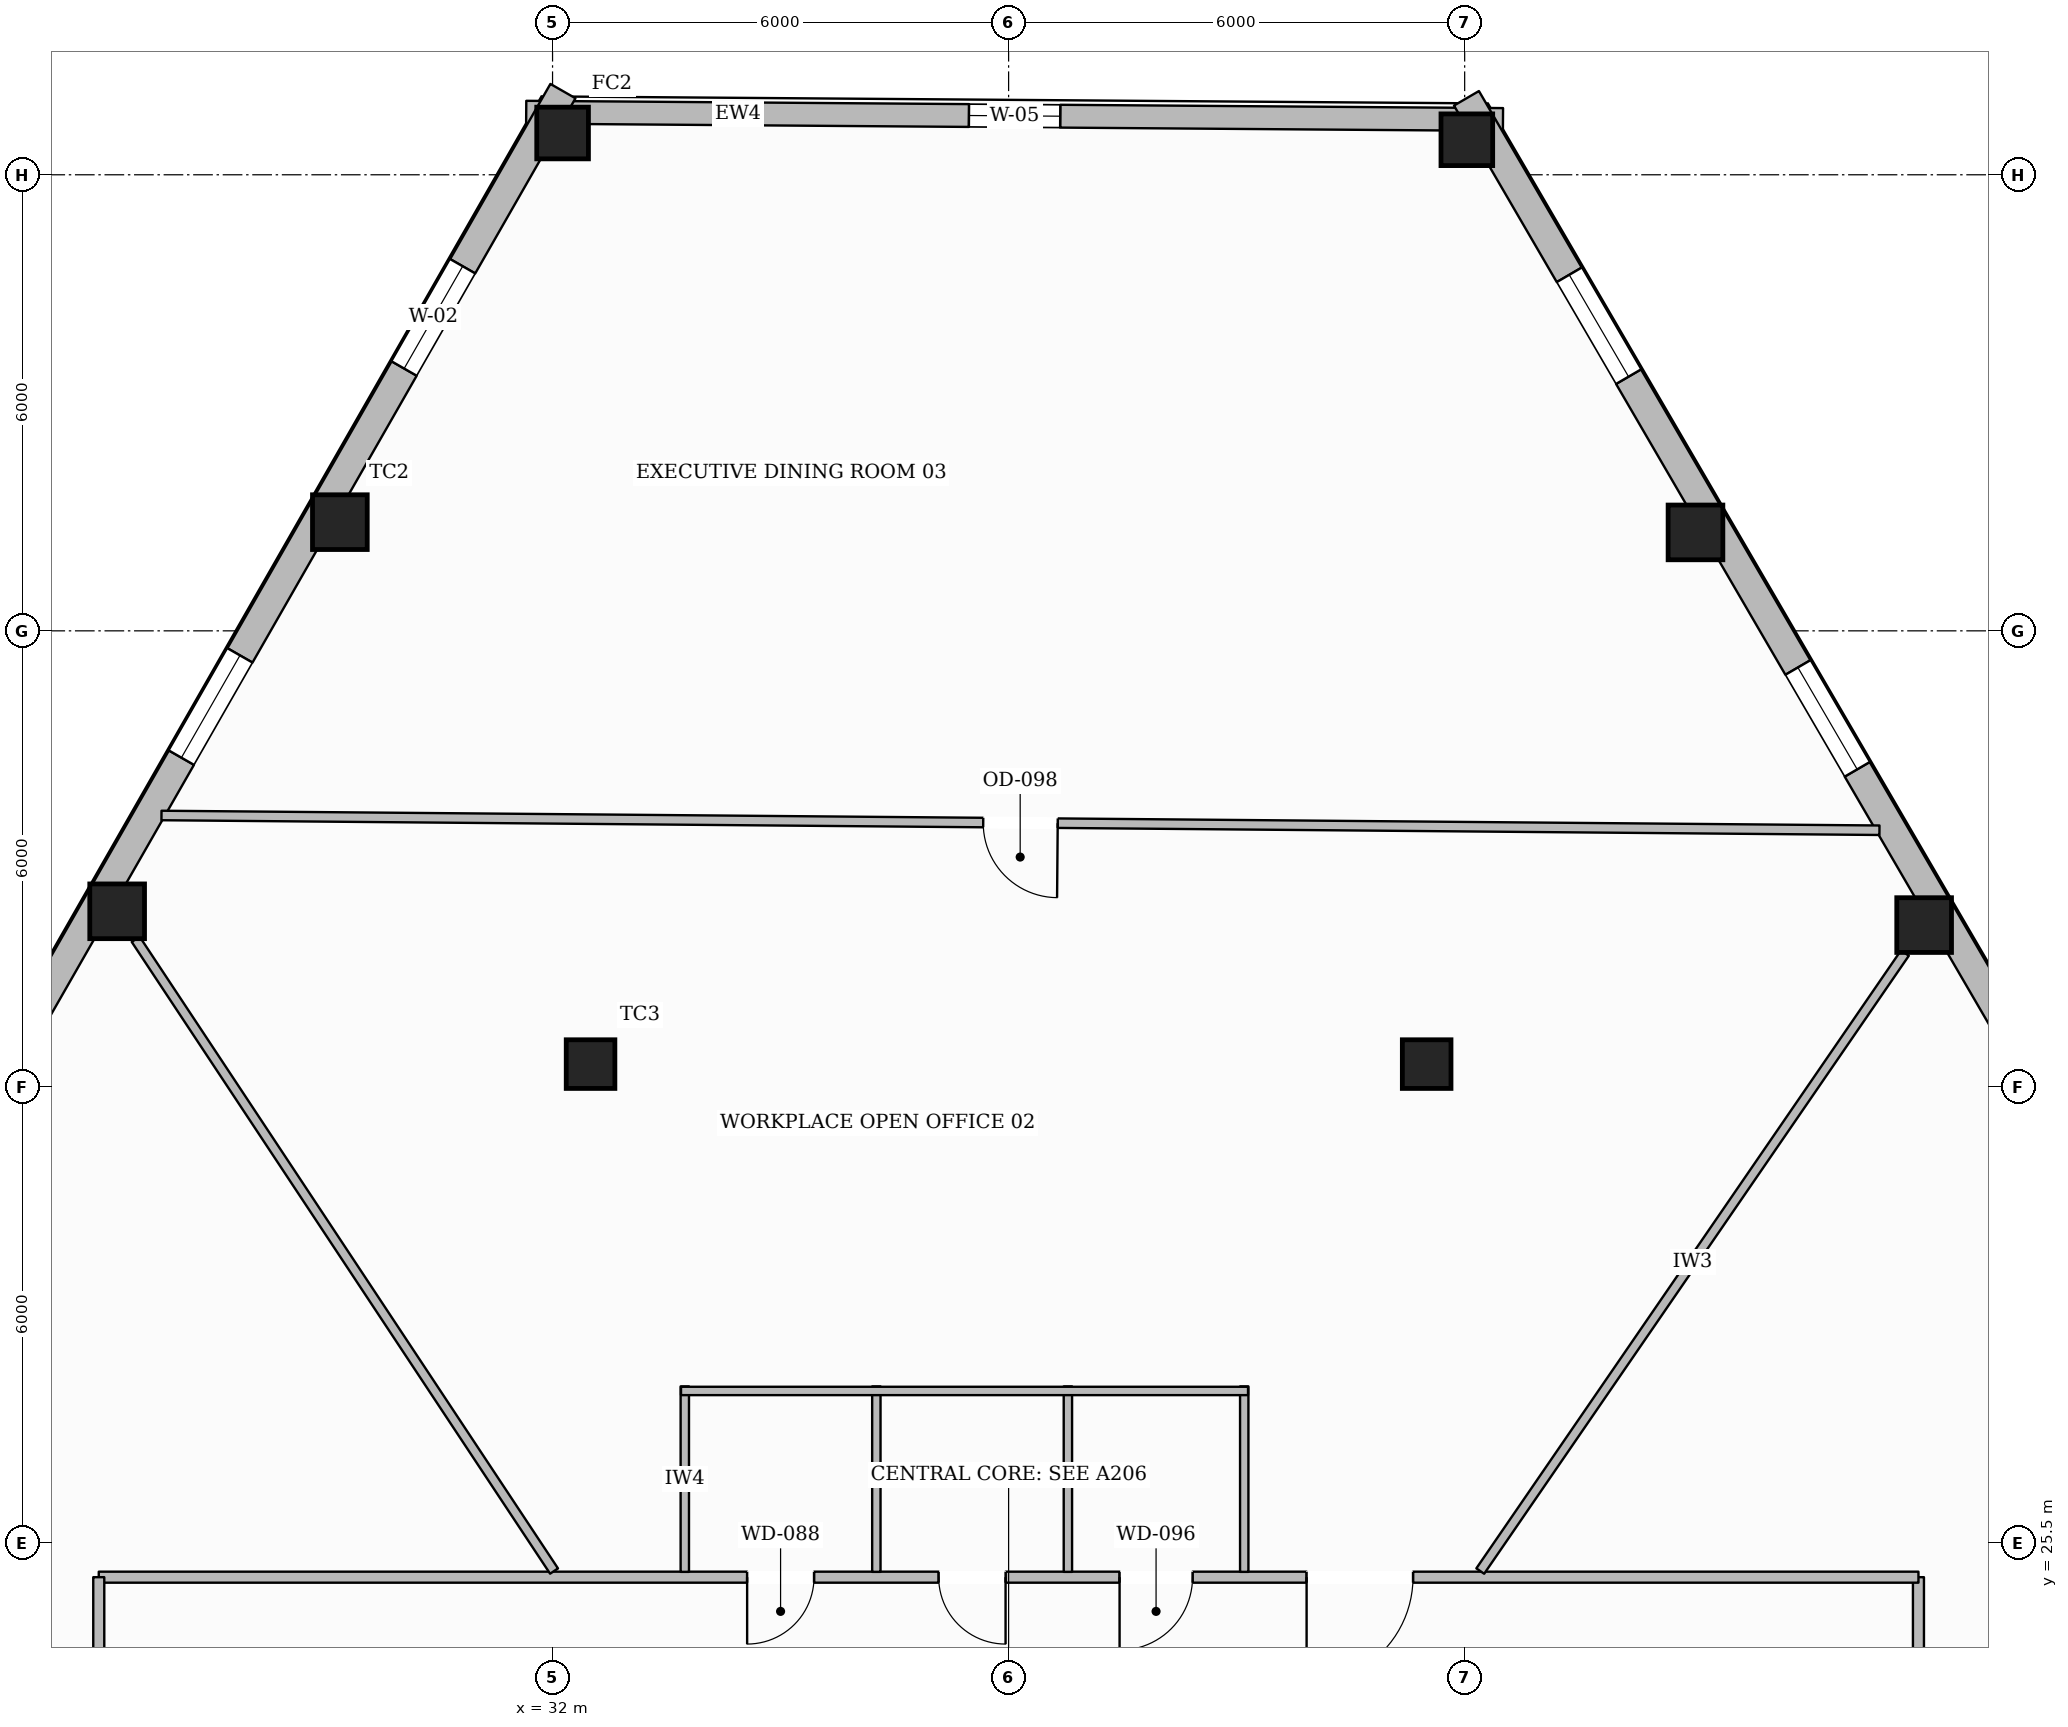
"""IFC4 building model, lengths in metres.
Left out: names, types, materials, properties, quantities, classifications, styles, units other than length and angle.
Written with IfcOpenShell. Run it as: python <this file> out.ifc"""

import sys

from ifc_helpers import new_model, si_unit, direction, frame, frame_2d, origin, origin_2d, place, context, subcontext, project, spatial, rectangle, hollow_rectangle, extrude, element, fill, save


model = new_model("IFC4")
c1 = context("Model", 3, precision=1e-05, world=origin(), true_north=direction((0.0, 1.0)))
c2 = subcontext(c1, "Body", "Model", "MODEL_VIEW")
j1 = project(units=[si_unit("LENGTHUNIT", "METRE"), si_unit("PLANEANGLEUNIT", "RADIAN")], contexts=[c1])
p1 = place(None, origin())
s1 = spatial("IfcSite", under=j1, at=p1, CompositionType="ELEMENT")
p2 = place(p1, origin())
s2 = spatial("IfcBuilding", under=s1, at=p2, CompositionType="ELEMENT")
p3 = place(p2, frame((0.0, 0.0, 116.3)))
s3 = spatial("IfcBuildingStorey", under=s2, at=p3, CompositionType="ELEMENT", Elevation=116.3)
p4 = place(p3, frame((32.132, 44.049, 0.0), z_axis=(0.0, 0.0, 1.0), x_axis=(1.0, 0.0, 0.0)))
e1 = element("IfcColumn", 1, at=p4, inside=s3, PredefinedType="COLUMN", context=c2, shape_type="SweptSolid", body=[
    extrude(hollow_rectangle(XDim=0.68, YDim=0.68, WallThickness=0.03, at=origin_2d()), origin(), (0.0, 0.0, 1.0), 3.6),
])
for number, where, z_axis, x_axis in (
    (2, (29.202, 38.93, 0.0), (0.0, 0.0, 1.0), (1.0, 0.0, 0.0)),
    (3, (26.272, 33.81, 0.0), (0.0, 0.0, 1.0), (1.0, 0.0, 0.0)),
    (4, (50.045, 33.629, 0.0), (0.0, 0.0, 1.0), (1.0, 0.0, 0.0)),
    (5, (47.037, 38.795, 0.0), (0.0, 0.0, 1.0), (1.0, 0.0, 0.0)),
):
    element("IfcColumn", number, at=place(p3, frame(where, z_axis=z_axis, x_axis=x_axis)), inside=s3, PredefinedType="COLUMN", context=c2, shape_type="SweptSolid", body=[
        extrude(hollow_rectangle(XDim=0.72, YDim=0.72, WallThickness=0.032, at=origin_2d()), origin(), (0.0, 0.0, 1.0), 3.6),
    ])
p5 = place(p3, frame((44.029, 43.961, 0.0), z_axis=(0.0, 0.0, 1.0), x_axis=(1.0, 0.0, 0.0)))
e6 = element("IfcColumn", 6, at=p5, inside=s3, PredefinedType="COLUMN", context=c2, shape_type="SweptSolid", body=[
    extrude(hollow_rectangle(XDim=0.68, YDim=0.68, WallThickness=0.03, at=origin_2d()), origin(), (0.0, 0.0, 1.0), 3.6),
])
for number, where, z_axis, x_axis in (
    (7, (32.5, 31.8, 0.0), (0.0, 0.0, 1.0), (1.0, 0.0, 0.0)),
    (8, (43.5, 31.8, 0.0), (0.0, 0.0, 1.0), (1.0, 0.0, 0.0)),
):
    element("IfcColumn", number, at=place(p3, frame(where, z_axis=z_axis, x_axis=x_axis)), inside=s3, PredefinedType="COLUMN", context=c2, shape_type="SweptSolid", body=[
        extrude(hollow_rectangle(XDim=0.64, YDim=0.64, WallThickness=0.028, at=origin_2d()), origin(), (0.0, 0.0, 1.0), 3.6),
    ])
p6 = place(p3, frame((31.654, 44.323, 0.0), z_axis=(0.0, 0.0, 1.0), x_axis=(0.999972269461, -0.007447167901, 0.0)))
e9 = element("IfcWall", 9, at=p6, inside=s3, PredefinedType="STANDARD", context=c2, shape_type="SweptSolid", body=[
    extrude(rectangle(XDim=12.851, YDim=0.3, at=frame_2d((6.425, 0.0))), origin(), (0.0, 0.0, 1.0), 3.059),
])
p7 = place(p6, frame((5.825, 0.0, 0.65)))
e10 = element("IfcOpeningElement", 10, at=p7, cuts=e9, PredefinedType="OPENING", context=c2, shape_type="SweptSolid", body=[
    extrude(rectangle(XDim=1.2, YDim=1.7, at=frame_2d((0.6, 0.85))), frame((0.0, 0.16, 0.0), z_axis=(0.0, -1.0, 0.0), x_axis=(1.0, 0.0, 0.0)), (0.0, 0.0, 1.0), 0.32),
])
p8 = place(p3, frame((14.08, 13.052, 0.0), z_axis=(0.0, 0.0, 1.0), x_axis=(0.496744930326, 0.867896580357, 0.0)))
e11 = element("IfcWall", 11, at=p8, inside=s3, PredefinedType="STANDARD", context=c2, shape_type="SweptSolid", body=[
    extrude(rectangle(XDim=36.351, YDim=0.38, at=frame_2d((18.175, 0.0))), origin(), (0.0, 0.0, 1.0), 3.059),
])
p9 = place(p8, frame((32.146, 0.0, 0.65)))
e12 = element("IfcOpeningElement", 12, at=p9, cuts=e11, PredefinedType="OPENING", context=c2, shape_type="SweptSolid", body=[
    extrude(rectangle(XDim=1.55, YDim=1.75, at=frame_2d((0.775, 0.875))), frame((0.0, 0.2, 0.0), z_axis=(0.0, -1.0, 0.0), x_axis=(1.0, 0.0, 0.0)), (0.0, 0.0, 1.0), 0.4),
])
p10 = place(p8, frame((26.247, 0.0, 0.65)))
e13 = element("IfcOpeningElement", 13, at=p10, cuts=e11, PredefinedType="OPENING", context=c2, shape_type="SweptSolid", body=[
    extrude(rectangle(XDim=1.55, YDim=1.75, at=frame_2d((0.775, 0.875))), frame((0.0, 0.2, 0.0), z_axis=(0.0, -1.0, 0.0), x_axis=(1.0, 0.0, 0.0)), (0.0, 0.0, 1.0), 0.4),
])
p11 = place(p8, frame((14.449, 0.0, 0.65)))
e14 = element("IfcOpeningElement", 14, at=p11, cuts=e11, PredefinedType="OPENING", context=c2, shape_type="SweptSolid", body=[
    extrude(rectangle(XDim=1.55, YDim=1.75, at=frame_2d((0.775, 0.875))), frame((0.0, 0.2, 0.0), z_axis=(0.0, -1.0, 0.0), x_axis=(1.0, 0.0, 0.0)), (0.0, 0.0, 1.0), 0.4),
])
p12 = place(p8, frame((8.55, 0.0, 0.65)))
e15 = element("IfcOpeningElement", 15, at=p12, cuts=e11, PredefinedType="OPENING", context=c2, shape_type="SweptSolid", body=[
    extrude(rectangle(XDim=1.55, YDim=1.75, at=frame_2d((0.775, 0.875))), frame((0.0, 0.2, 0.0), z_axis=(0.0, -1.0, 0.0), x_axis=(1.0, 0.0, 0.0)), (0.0, 0.0, 1.0), 0.4),
])
p13 = place(p8, frame((2.652, 0.0, 0.65)))
e16 = element("IfcOpeningElement", 16, at=p13, cuts=e11, PredefinedType="OPENING", context=c2, shape_type="SweptSolid", body=[
    extrude(rectangle(XDim=1.55, YDim=1.75, at=frame_2d((0.775, 0.875))), frame((0.0, 0.2, 0.0), z_axis=(0.0, -1.0, 0.0), x_axis=(1.0, 0.0, 0.0)), (0.0, 0.0, 1.0), 0.4),
])
p14 = place(p3, frame((44.024, 44.506, 0.0), z_axis=(0.0, 0.0, 1.0), x_axis=(0.503202137133, -0.864168738838, 0.0)))
e17 = element("IfcWall", 17, at=p14, inside=s3, PredefinedType="STANDARD", context=c2, shape_type="SweptSolid", body=[
    extrude(rectangle(XDim=36.818, YDim=0.38, at=frame_2d((18.409, 0.0))), origin(), (0.0, 0.0, 1.0), 3.059),
])
p15 = place(p14, frame((32.577, 0.0, 0.65)))
e18 = element("IfcOpeningElement", 18, at=p15, cuts=e17, PredefinedType="OPENING", context=c2, shape_type="SweptSolid", body=[
    extrude(rectangle(XDim=1.55, YDim=1.75, at=frame_2d((0.775, 0.875))), frame((0.0, 0.2, 0.0), z_axis=(0.0, -1.0, 0.0), x_axis=(1.0, 0.0, 0.0)), (0.0, 0.0, 1.0), 0.4),
])
p16 = place(p14, frame((26.599, 0.0, 0.65)))
e19 = element("IfcOpeningElement", 19, at=p16, cuts=e17, PredefinedType="OPENING", context=c2, shape_type="SweptSolid", body=[
    extrude(rectangle(XDim=1.55, YDim=1.75, at=frame_2d((0.775, 0.875))), frame((0.0, 0.2, 0.0), z_axis=(0.0, -1.0, 0.0), x_axis=(1.0, 0.0, 0.0)), (0.0, 0.0, 1.0), 0.4),
])
p17 = place(p14, frame((14.643, 0.0, 0.65)))
e20 = element("IfcOpeningElement", 20, at=p17, cuts=e17, PredefinedType="OPENING", context=c2, shape_type="SweptSolid", body=[
    extrude(rectangle(XDim=1.55, YDim=1.75, at=frame_2d((0.775, 0.875))), frame((0.0, 0.2, 0.0), z_axis=(0.0, -1.0, 0.0), x_axis=(1.0, 0.0, 0.0)), (0.0, 0.0, 1.0), 0.4),
])
p18 = place(p14, frame((8.665, 0.0, 0.65)))
e21 = element("IfcOpeningElement", 21, at=p18, cuts=e17, PredefinedType="OPENING", context=c2, shape_type="SweptSolid", body=[
    extrude(rectangle(XDim=1.55, YDim=1.75, at=frame_2d((0.775, 0.875))), frame((0.0, 0.2, 0.0), z_axis=(0.0, -1.0, 0.0), x_axis=(1.0, 0.0, 0.0)), (0.0, 0.0, 1.0), 0.4),
])
p19 = place(p14, frame((2.688, 0.0, 0.65)))
e22 = element("IfcOpeningElement", 22, at=p19, cuts=e17, PredefinedType="OPENING", context=c2, shape_type="SweptSolid", body=[
    extrude(rectangle(XDim=1.55, YDim=1.75, at=frame_2d((0.775, 0.875))), frame((0.0, 0.2, 0.0), z_axis=(0.0, -1.0, 0.0), x_axis=(1.0, 0.0, 0.0)), (0.0, 0.0, 1.0), 0.4),
])
p20 = place(p3, frame((49.97, 7.15, 0.0), z_axis=(0.0, 0.0, 1.0), x_axis=(0.0, 1.0, 0.0)))
e23 = element("IfcWall", 23, at=p20, inside=s3, PredefinedType="PARTITIONING", context=c2, shape_type="SweptSolid", body=[
    extrude(rectangle(XDim=17.9, YDim=0.145, at=frame_2d((8.95, 0.0))), origin(), (0.0, 0.0, 1.0), 3.288),
])
p21 = place(p20, frame((8.25, 0.0, 0.0)))
e24 = element("IfcOpeningElement", 24, at=p21, cuts=e23, PredefinedType="OPENING", context=c2, shape_type="SweptSolid", body=[
    extrude(rectangle(XDim=1.4, YDim=2.2, at=frame_2d((0.7, 1.1))), frame((0.0, 0.083, 0.0), z_axis=(0.0, -1.0, 0.0), x_axis=(1.0, 0.0, 0.0)), (0.0, 0.0, 1.0), 0.165),
])
p22 = place(p3, frame((49.97, 25.05, 0.0), z_axis=(0.0, 0.0, 1.0), x_axis=(-1.0, 0.0, 0.0)))
e25 = element("IfcWall", 25, at=p22, inside=s3, PredefinedType="PARTITIONING", context=c2, shape_type="SweptSolid", body=[
    extrude(rectangle(XDim=23.94, YDim=0.145, at=frame_2d((11.97, 0.0))), origin(), (0.0, 0.0, 1.0), 3.6),
])
p23 = place(p22, frame((14.53, 0.0, 0.0)))
e26 = element("IfcOpeningElement", 26, at=p23, cuts=e25, PredefinedType="OPENING", context=c2, shape_type="SweptSolid", body=[
    extrude(rectangle(XDim=0.88, YDim=2.1, at=frame_2d((0.44, 1.05))), frame((0.0, 0.083, 0.0), z_axis=(0.0, -1.0, 0.0), x_axis=(1.0, 0.0, 0.0)), (0.0, 0.0, 1.0), 0.165),
])
p24 = place(p22, frame((12.01, 0.0, 0.0)))
e27 = element("IfcOpeningElement", 27, at=p24, cuts=e25, PredefinedType="OPENING", context=c2, shape_type="SweptSolid", body=[
    extrude(rectangle(XDim=0.88, YDim=2.1, at=frame_2d((0.44, 1.05))), frame((0.0, 0.083, 0.0), z_axis=(0.0, -1.0, 0.0), x_axis=(1.0, 0.0, 0.0)), (0.0, 0.0, 1.0), 0.165),
])
p25 = place(p22, frame((9.55, 0.0, 0.0)))
e28 = element("IfcOpeningElement", 28, at=p25, cuts=e25, PredefinedType="OPENING", context=c2, shape_type="SweptSolid", body=[
    extrude(rectangle(XDim=0.96, YDim=2.1, at=frame_2d((0.48, 1.05))), frame((0.0, 0.083, 0.0), z_axis=(0.0, -1.0, 0.0), x_axis=(1.0, 0.0, 0.0)), (0.0, 0.0, 1.0), 0.165),
])
p26 = place(p22, frame((6.649, 0.0, 0.0)))
e29 = element("IfcOpeningElement", 29, at=p26, cuts=e25, PredefinedType="OPENING", context=c2, shape_type="SweptSolid", body=[
    extrude(rectangle(XDim=1.4, YDim=2.2, at=frame_2d((0.7, 1.1))), frame((0.0, 0.083, 0.0), z_axis=(0.0, -1.0, 0.0), x_axis=(1.0, 0.0, 0.0)), (0.0, 0.0, 1.0), 0.165),
])
p27 = place(p3, frame((26.03, 25.05, 0.0), z_axis=(0.0, 0.0, 1.0), x_axis=(0.0, -1.0, 0.0)))
e30 = element("IfcWall", 30, at=p27, inside=s3, PredefinedType="PARTITIONING", context=c2, shape_type="SweptSolid", body=[
    extrude(rectangle(XDim=17.9, YDim=0.145, at=frame_2d((8.95, 0.0))), origin(), (0.0, 0.0, 1.0), 3.288),
])
p28 = place(p27, frame((4.717, 0.0, 0.0)))
e31 = element("IfcOpeningElement", 31, at=p28, cuts=e30, PredefinedType="OPENING", context=c2, shape_type="SweptSolid", body=[
    extrude(rectangle(XDim=1.4, YDim=2.2, at=frame_2d((0.7, 1.1))), frame((0.0, 0.083, 0.0), z_axis=(0.0, -1.0, 0.0), x_axis=(1.0, 0.0, 0.0)), (0.0, 0.0, 1.0), 0.165),
])
for number, where, z_axis, x_axis in (
    (32, (33.74, 25.12, 0.0), (0.0, 0.0, 1.0), (0.0, 1.0, 0.0)),
    (33, (36.26, 25.12, 0.0), (0.0, 0.0, 1.0), (0.0, 1.0, 0.0)),
    (34, (38.78, 25.12, 0.0), (0.0, 0.0, 1.0), (0.0, 1.0, 0.0)),
    (35, (41.1, 25.12, 0.0), (0.0, 0.0, 1.0), (0.0, 1.0, 0.0)),
):
    element("IfcWall", number, at=place(p3, frame(where, z_axis=z_axis, x_axis=x_axis)), inside=s3, PredefinedType="PLUMBINGWALL", context=c2, shape_type="SweptSolid", body=[
        extrude(rectangle(XDim=2.44, YDim=0.11, at=frame_2d((1.22, 0.0))), origin(), (0.0, 0.0, 1.0), 3.6),
    ])
p29 = place(p3, frame((33.69, 27.5, 0.0), z_axis=(0.0, 0.0, 1.0), x_axis=(1.0, 0.0, 0.0)))
e36 = element("IfcWall", 36, at=p29, inside=s3, PredefinedType="PLUMBINGWALL", context=c2, shape_type="SweptSolid", body=[
    extrude(rectangle(XDim=7.46, YDim=0.11, at=frame_2d((3.73, 0.0))), origin(), (0.0, 0.0, 1.0), 3.6),
])
p30 = place(p3, frame((44.205, 25.131, 0.0), z_axis=(0.0, 0.0, 1.0), x_axis=(0.566341849748, 0.824170437, 0.0)))
e37 = element("IfcWall", 37, at=p30, inside=s3, PredefinedType="PARTITIONING", context=c2, shape_type="SweptSolid", body=[
    extrude(rectangle(XDim=9.865, YDim=0.125, at=frame_2d((4.933, 0.0))), origin(), (0.0, 0.0, 1.0), 3.6),
])
p31 = place(p3, frame((32.02, 25.131, 0.0), z_axis=(0.0, 0.0, 1.0), x_axis=(-0.552143125639, 0.833749344113, 0.0)))
e38 = element("IfcWall", 38, at=p31, inside=s3, PredefinedType="PARTITIONING", context=c2, shape_type="SweptSolid", body=[
    extrude(rectangle(XDim=9.969, YDim=0.125, at=frame_2d((4.985, 0.0))), origin(), (0.0, 0.0, 1.0), 3.6),
])
p32 = place(p3, frame((49.457, 34.877, 0.0), z_axis=(0.0, 0.0, 1.0), x_axis=(-0.99996313072, 0.008587036757, 0.0)))
e39 = element("IfcWall", 39, at=p32, inside=s3, PredefinedType="PARTITIONING", context=c2, shape_type="SweptSolid", body=[
    extrude(rectangle(XDim=22.603, YDim=0.125, at=frame_2d((11.301, 0.0))), origin(), (0.0, 0.0, 1.0), 3.6),
])
p33 = place(p32, frame((10.811, 0.0, 0.0)))
e40 = element("IfcOpeningElement", 40, at=p33, cuts=e39, PredefinedType="OPENING", context=c2, shape_type="SweptSolid", body=[
    extrude(rectangle(XDim=0.98, YDim=2.15, at=frame_2d((0.49, 1.075))), frame((0.0, 0.073, 0.0), z_axis=(0.0, -1.0, 0.0), x_axis=(1.0, 0.0, 0.0)), (0.0, 0.0, 1.0), 0.145),
])
p34 = place(p9, origin())
e41 = element("IfcWindow", 41, at=p34, inside=s3, PartitioningType="SINGLE_PANEL", PredefinedType="WINDOW", context=c2, shape_type="SweptSolid", body=[
    extrude(rectangle(XDim=1.55, YDim=1.75, at=frame_2d((0.775, 0.875))), frame((0.0, 0.03, 0.0), z_axis=(0.0, -1.0, 0.0), x_axis=(1.0, 0.0, 0.0)), (0.0, 0.0, 1.0), 0.06),
])
fill(e12, e41)
p35 = place(p10, origin())
e42 = element("IfcWindow", 42, at=p35, inside=s3, PartitioningType="SINGLE_PANEL", PredefinedType="WINDOW", context=c2, shape_type="SweptSolid", body=[
    extrude(rectangle(XDim=1.55, YDim=1.75, at=frame_2d((0.775, 0.875))), frame((0.0, 0.03, 0.0), z_axis=(0.0, -1.0, 0.0), x_axis=(1.0, 0.0, 0.0)), (0.0, 0.0, 1.0), 0.06),
])
fill(e13, e42)
p36 = place(p18, origin())
e43 = element("IfcWindow", 43, at=p36, inside=s3, PartitioningType="SINGLE_PANEL", PredefinedType="WINDOW", context=c2, shape_type="SweptSolid", body=[
    extrude(rectangle(XDim=1.55, YDim=1.75, at=frame_2d((0.775, 0.875))), frame((0.0, 0.03, 0.0), z_axis=(0.0, -1.0, 0.0), x_axis=(1.0, 0.0, 0.0)), (0.0, 0.0, 1.0), 0.06),
])
fill(e21, e43)
p37 = place(p19, origin())
e44 = element("IfcWindow", 44, at=p37, inside=s3, PartitioningType="SINGLE_PANEL", PredefinedType="WINDOW", context=c2, shape_type="SweptSolid", body=[
    extrude(rectangle(XDim=1.55, YDim=1.75, at=frame_2d((0.775, 0.875))), frame((0.0, 0.03, 0.0), z_axis=(0.0, -1.0, 0.0), x_axis=(1.0, 0.0, 0.0)), (0.0, 0.0, 1.0), 0.06),
])
fill(e22, e44)
p38 = place(p7, origin())
e45 = element("IfcWindow", 45, at=p38, inside=s3, PartitioningType="SINGLE_PANEL", PredefinedType="WINDOW", context=c2, shape_type="SweptSolid", body=[
    extrude(rectangle(XDim=1.2, YDim=1.7, at=frame_2d((0.6, 0.85))), frame((0.0, 0.03, 0.0), z_axis=(0.0, -1.0, 0.0), x_axis=(1.0, 0.0, 0.0)), (0.0, 0.0, 1.0), 0.06),
])
fill(e10, e45)
p39 = place(p23, origin())
e46 = element("IfcDoor", 46, at=p39, inside=s3, OperationType="SINGLE_SWING_RIGHT", PredefinedType="DOOR", context=c2, shape_type="SweptSolid", body=[
    extrude(rectangle(XDim=0.88, YDim=2.1, at=frame_2d((0.44, 1.05))), frame((0.0, 0.025, 0.0), z_axis=(0.0, -1.0, 0.0), x_axis=(1.0, 0.0, 0.0)), (0.0, 0.0, 1.0), 0.05),
])
fill(e26, e46)
p40 = place(p24, origin())
e47 = element("IfcDoor", 47, at=p40, inside=s3, OperationType="SINGLE_SWING_LEFT", PredefinedType="DOOR", context=c2, shape_type="SweptSolid", body=[
    extrude(rectangle(XDim=0.88, YDim=2.1, at=frame_2d((0.44, 1.05))), frame((0.0, 0.025, 0.0), z_axis=(0.0, -1.0, 0.0), x_axis=(1.0, 0.0, 0.0)), (0.0, 0.0, 1.0), 0.05),
])
fill(e27, e47)
p41 = place(p25, origin())
e48 = element("IfcDoor", 48, at=p41, inside=s3, OperationType="SINGLE_SWING_RIGHT", PredefinedType="DOOR", context=c2, shape_type="SweptSolid", body=[
    extrude(rectangle(XDim=0.96, YDim=2.1, at=frame_2d((0.48, 1.05))), frame((0.0, 0.025, 0.0), z_axis=(0.0, -1.0, 0.0), x_axis=(1.0, 0.0, 0.0)), (0.0, 0.0, 1.0), 0.05),
])
fill(e28, e48)
p42 = place(p26, origin())
e49 = element("IfcDoor", 49, at=p42, inside=s3, OperationType="SINGLE_SWING_RIGHT", PredefinedType="DOOR", context=c2, shape_type="SweptSolid", body=[
    extrude(rectangle(XDim=1.4, YDim=2.2, at=frame_2d((0.7, 1.1))), frame((0.0, 0.025, 0.0), z_axis=(0.0, -1.0, 0.0), x_axis=(1.0, 0.0, 0.0)), (0.0, 0.0, 1.0), 0.05),
])
fill(e29, e49)
p43 = place(p33, origin())
e50 = element("IfcDoor", 50, at=p43, inside=s3, OperationType="SINGLE_SWING_LEFT", PredefinedType="DOOR", context=c2, shape_type="SweptSolid", body=[
    extrude(rectangle(XDim=0.98, YDim=2.15, at=frame_2d((0.49, 1.075))), frame((0.0, 0.025, 0.0), z_axis=(0.0, -1.0, 0.0), x_axis=(1.0, 0.0, 0.0)), (0.0, 0.0, 1.0), 0.05),
])
fill(e40, e50)
save(model, sys.argv[1])
